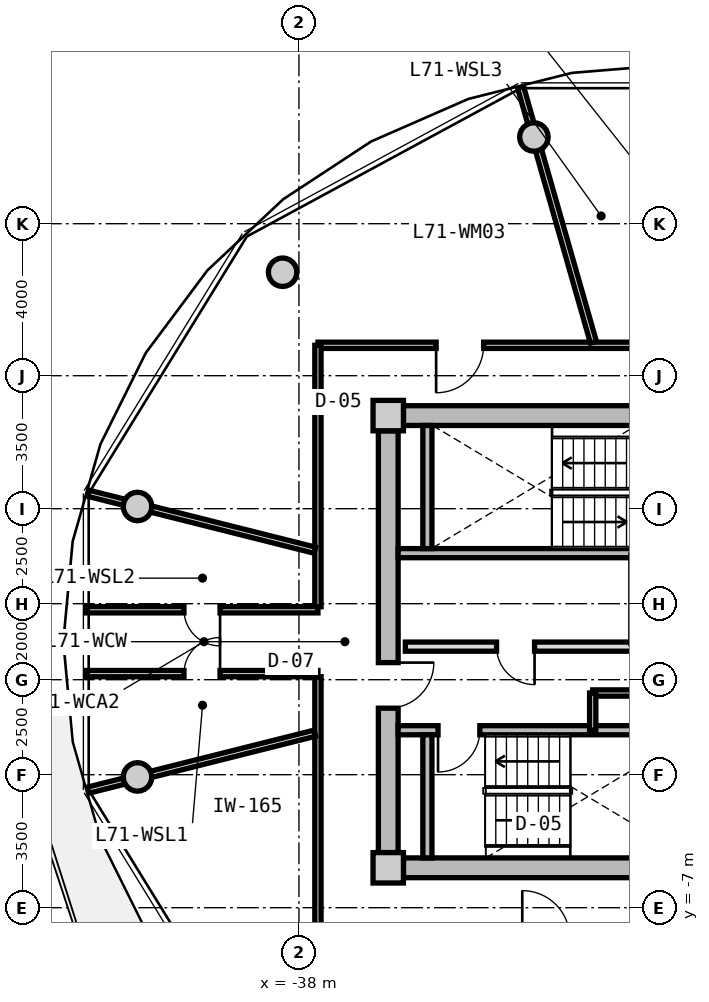
"""IFC4 building model, lengths in metres.
Left out: names, types, materials, properties, quantities, classifications, styles, units other than length and angle.
Written with IfcOpenShell. Run it as: python <this file> out.ifc"""

import sys

from ifc_helpers import new_model, si_unit, direction, frame, frame_2d, origin, origin_2d, place, context, subcontext, project, spatial, rectangle, circle, extrude, source, transform, mapped, element, fill, save


model = new_model("IFC4")
c1 = context("Model", 3, precision=1e-05, world=origin(), true_north=direction((0.0, 1.0)))
c2 = subcontext(c1, "Body", "Model", "MODEL_VIEW")
j1 = project(units=[si_unit("LENGTHUNIT", "METRE"), si_unit("PLANEANGLEUNIT", "RADIAN")], contexts=[c1])
p1 = place(None, origin())
s1 = spatial("IfcSite", under=j1, at=p1, CompositionType="ELEMENT")
p2 = place(p1, origin())
s2 = spatial("IfcBuilding", under=s1, at=p2, CompositionType="ELEMENT")
p3 = place(p2, frame((0.0, 0.0, 229.15)))
s3 = spatial("IfcBuildingStorey", under=s2, at=p3, CompositionType="ELEMENT", Elevation=229.15)
m1 = source(origin(), c2, "Body", "SweptSolid", [
    extrude(rectangle(XDim=0.8, YDim=0.8, at=origin_2d()), origin(), (0.0, 0.0, 1.0), 3.05),
])
for number, where, z_axis, x_axis in (
    (1, (-35.65, -5.95, 0.0), (0.0, 0.0, 1.0), (1.0, 0.0, 0.0)),
    (2, (-35.65, 5.95, 0.0), (0.0, 0.0, 1.0), (1.0, 0.0, 0.0)),
):
    element("IfcColumn", number, at=place(p3, frame(where, z_axis=z_axis, x_axis=x_axis)), inside=s3, PredefinedType="COLUMN", context=c2, shape_type="MappedRepresentation", body=[
        mapped(m1, transform((0.0, 0.0, 0.0), x_axis=(1.0, 0.0, 0.0), y_axis=(0.0, 1.0, 0.0), z_axis=(0.0, 0.0, 1.0), scale=1.0)),
    ])
m2 = source(origin(), c2, "Body", "SweptSolid", [
    extrude(rectangle(XDim=14.5, YDim=0.52, at=frame_2d((7.25, 0.0))), origin(), (0.0, 0.0, 1.0), 2.81),
])
for number, where, z_axis, x_axis in (
    (3, (-35.25, 5.95, 0.0), (0.0, 0.0, 1.0), (1.0, 0.0, 0.0)),
    (4, (-20.75, -5.95, 0.0), (0.0, 0.0, 1.0), (-1.0, 0.0, 0.0)),
):
    element("IfcWall", number, at=place(p3, frame(where, z_axis=z_axis, x_axis=x_axis)), inside=s3, PredefinedType="SHEAR", context=c2, shape_type="MappedRepresentation", body=[
        mapped(m2, transform((0.0, 0.0, 0.0), x_axis=(1.0, 0.0, 0.0), y_axis=(0.0, 1.0, 0.0), z_axis=(0.0, 0.0, 1.0), scale=1.0)),
    ])
m3 = source(origin(), c2, "Body", "SweptSolid", [
    extrude(rectangle(XDim=11.1, YDim=0.52, at=frame_2d((5.55, 0.0))), origin(), (0.0, 0.0, 1.0), 2.81),
])
p4 = place(p3, frame((-35.65, -5.55, 0.0), z_axis=(0.0, 0.0, 1.0), x_axis=(0.0, 1.0, 0.0)))
e5 = element("IfcWall", 5, at=p4, inside=s3, PredefinedType="SHEAR", context=c2, shape_type="MappedRepresentation", body=[
    mapped(m3, transform((0.0, 0.0, 0.0), x_axis=(1.0, 0.0, 0.0), y_axis=(0.0, 1.0, 0.0), z_axis=(0.0, 0.0, 1.0), scale=1.0)),
])
p5 = place(p4, frame((3.8, 0.0, 0.0)))
e6 = element("IfcOpeningElement", 6, at=p5, cuts=e5, PredefinedType="OPENING", context=c2, shape_type="SweptSolid", body=[
    extrude(rectangle(XDim=1.2, YDim=2.15, at=frame_2d((0.6, 1.075))), frame((0.0, 0.27, 0.0), z_axis=(0.0, -1.0, 0.0), x_axis=(1.0, 0.0, 0.0)), (0.0, 0.0, 1.0), 0.54),
])
m4 = source(origin(), c2, "Body", "SweptSolid", [
    extrude(circle(Radius=0.375, at=origin_2d()), origin(), (0.0, 0.0, 1.0), 3.05),
])
for number, where, z_axis, x_axis in (
    (7, (-31.818, 13.281, 0.0), (0.0, 0.0, 1.0), (1.0, 0.0, 0.0)),
    (8, (-38.43, 9.723, 0.0), (0.0, 0.0, 1.0), (1.0, 0.0, 0.0)),
    (9, (-42.247, 3.559, 0.0), (0.0, 0.0, 1.0), (1.0, 0.0, 0.0)),
    (10, (-42.247, -3.559, 0.0), (0.0, 0.0, 1.0), (1.0, 0.0, 0.0)),
):
    element("IfcColumn", number, at=place(p3, frame(where, z_axis=z_axis, x_axis=x_axis)), inside=s3, PredefinedType="COLUMN", context=c2, shape_type="MappedRepresentation", body=[
        mapped(m4, transform((0.0, 0.0, 0.0), x_axis=(1.0, 0.0, 0.0), y_axis=(0.0, 1.0, 0.0), z_axis=(0.0, 0.0, 1.0), scale=1.0)),
    ])
m5 = source(origin(), c2, "Body", "SweptSolid", [
    extrude(rectangle(XDim=7.93, YDim=0.24, at=frame_2d((3.965, 0.0))), origin(), (0.0, 0.0, 1.0), 2.81),
])
p6 = place(p3, frame((-35.39, 2.33, 0.0), z_axis=(0.0, 0.0, 1.0), x_axis=(1.0, 0.0, 0.0)))
e11 = element("IfcWall", 11, at=p6, inside=s3, PredefinedType="PARTITIONING", context=c2, shape_type="MappedRepresentation", body=[
    mapped(m5, transform((0.0, 0.0, 0.0), x_axis=(1.0, 0.0, 0.0), y_axis=(0.0, 1.0, 0.0), z_axis=(0.0, 0.0, 1.0), scale=1.0)),
])
m6 = source(origin(), c2, "Body", "SweptSolid", [
    extrude(rectangle(XDim=3.24, YDim=0.24, at=frame_2d((1.62, 0.0))), origin(), (0.0, 0.0, 1.0), 2.81),
])
p7 = place(p3, frame((-34.62, 2.45, 0.0), z_axis=(0.0, 0.0, 1.0), x_axis=(0.0, 1.0, 0.0)))
e12 = element("IfcWall", 12, at=p7, inside=s3, PredefinedType="PARTITIONING", context=c2, shape_type="MappedRepresentation", body=[
    mapped(m6, transform((0.0, 0.0, 0.0), x_axis=(1.0, 0.0, 0.0), y_axis=(0.0, 1.0, 0.0), z_axis=(0.0, 0.0, 1.0), scale=1.0)),
])
p8 = place(p3, frame((-35.39, -2.33, 0.0), z_axis=(0.0, 0.0, 1.0), x_axis=(1.0, 0.0, 0.0)))
e13 = element("IfcWall", 13, at=p8, inside=s3, PredefinedType="PARTITIONING", context=c2, shape_type="MappedRepresentation", body=[
    mapped(m5, transform((0.0, 0.0, 0.0), x_axis=(1.0, 0.0, 0.0), y_axis=(0.0, 1.0, 0.0), z_axis=(0.0, 0.0, 1.0), scale=1.0)),
])
p9 = place(p8, frame((1.05, 0.0, 0.0)))
e14 = element("IfcOpeningElement", 14, at=p9, cuts=e13, PredefinedType="OPENING", context=c2, shape_type="SweptSolid", body=[
    extrude(rectangle(XDim=1.1, YDim=2.15, at=frame_2d((0.55, 1.075))), frame((0.0, 0.13, 0.0), z_axis=(0.0, -1.0, 0.0), x_axis=(1.0, 0.0, 0.0)), (0.0, 0.0, 1.0), 0.26),
])
p10 = place(p3, frame((-34.62, -5.69, 0.0), z_axis=(0.0, 0.0, 1.0), x_axis=(0.0, 1.0, 0.0)))
e15 = element("IfcWall", 15, at=p10, inside=s3, PredefinedType="PARTITIONING", context=c2, shape_type="MappedRepresentation", body=[
    mapped(m6, transform((0.0, 0.0, 0.0), x_axis=(1.0, 0.0, 0.0), y_axis=(0.0, 1.0, 0.0), z_axis=(0.0, 0.0, 1.0), scale=1.0)),
])
m7 = source(origin(), c2, "Body", "SweptSolid", [
    extrude(rectangle(XDim=7.62, YDim=0.24, at=frame_2d((3.81, 0.0))), origin(), (0.0, 0.0, 1.0), 2.795),
])
p11 = place(p3, frame((-35.2, -0.13, 0.0), z_axis=(0.0, 0.0, 1.0), x_axis=(1.0, 0.0, 0.0)))
e16 = element("IfcWall", 16, at=p11, inside=s3, PredefinedType="PARTITIONING", context=c2, shape_type="MappedRepresentation", body=[
    mapped(m7, transform((0.0, 0.0, 0.0), x_axis=(1.0, 0.0, 0.0), y_axis=(0.0, 1.0, 0.0), z_axis=(0.0, 0.0, 1.0), scale=1.0)),
])
p12 = place(p11, frame((6.22, 0.0, 0.0)))
e17 = element("IfcOpeningElement", 17, at=p12, cuts=e16, PredefinedType="OPENING", context=c2, shape_type="SweptSolid", body=[
    extrude(rectangle(XDim=1.0, YDim=2.1, at=frame_2d((0.5, 1.05))), frame((0.0, 0.13, 0.0), z_axis=(0.0, -1.0, 0.0), x_axis=(1.0, 0.0, 0.0)), (0.0, 0.0, 1.0), 0.26),
])
p13 = place(p11, frame((2.4, 0.0, 0.0)))
e18 = element("IfcOpeningElement", 18, at=p13, cuts=e16, PredefinedType="OPENING", context=c2, shape_type="SweptSolid", body=[
    extrude(rectangle(XDim=1.0, YDim=2.1, at=frame_2d((0.5, 1.05))), frame((0.0, 0.13, 0.0), z_axis=(0.0, -1.0, 0.0), x_axis=(1.0, 0.0, 0.0)), (0.0, 0.0, 1.0), 0.26),
])
m8 = source(origin(), c2, "Body", "SweptSolid", [
    extrude(rectangle(XDim=4.77, YDim=0.165, at=frame_2d((2.385, 0.0))), origin(), (0.0, 0.0, 1.0), 2.795),
])
p14 = place(p3, frame((-30.27, -1.35, 0.0), z_axis=(0.0, 0.0, 1.0), x_axis=(1.0, 0.0, 0.0)))
e19 = element("IfcWall", 19, at=p14, inside=s3, PredefinedType="PARTITIONING", context=c2, shape_type="MappedRepresentation", body=[
    mapped(m8, transform((0.0, 0.0, 0.0), x_axis=(1.0, 0.0, 0.0), y_axis=(0.0, 1.0, 0.0), z_axis=(0.0, 0.0, 1.0), scale=1.0)),
])
p15 = place(p14, frame((1.85, 0.0, 0.0)))
e20 = element("IfcOpeningElement", 20, at=p15, cuts=e19, PredefinedType="OPENING", context=c2, shape_type="SweptSolid", body=[
    extrude(rectangle(XDim=1.0, YDim=2.1, at=frame_2d((0.5, 1.05))), frame((0.0, 0.093, 0.0), z_axis=(0.0, -1.0, 0.0), x_axis=(1.0, 0.0, 0.0)), (0.0, 0.0, 1.0), 0.185),
])
m9 = source(origin(), c2, "Body", "SweptSolid", [
    extrude(rectangle(XDim=0.98, YDim=0.165, at=frame_2d((0.49, 0.0))), origin(), (0.0, 0.0, 1.0), 2.795),
])
p16 = place(p3, frame((-30.27, -2.33, 0.0), z_axis=(0.0, 0.0, 1.0), x_axis=(0.0, 1.0, 0.0)))
e21 = element("IfcWall", 21, at=p16, inside=s3, PredefinedType="PARTITIONING", context=c2, shape_type="MappedRepresentation", body=[
    mapped(m9, transform((0.0, 0.0, 0.0), x_axis=(1.0, 0.0, 0.0), y_axis=(0.0, 1.0, 0.0), z_axis=(0.0, 0.0, 1.0), scale=1.0)),
])
m10 = source(origin(), c2, "Body", "SweptSolid", [
    extrude(rectangle(XDim=8.58, YDim=0.165, at=frame_2d((4.29, 0.0))), origin(), (0.0, 0.0, 1.0), 2.795),
])
p17 = place(p3, frame((-37.5, 7.8, 0.0), z_axis=(0.0, 0.0, 1.0), x_axis=(1.0, 0.0, 0.0)))
e22 = element("IfcWall", 22, at=p17, inside=s3, PredefinedType="PARTITIONING", context=c2, shape_type="MappedRepresentation", body=[
    mapped(m10, transform((0.0, 0.0, 0.0), x_axis=(1.0, 0.0, 0.0), y_axis=(0.0, 1.0, 0.0), z_axis=(0.0, 0.0, 1.0), scale=1.0)),
])
p18 = place(p17, frame((3.11, 0.0, 0.0)))
e23 = element("IfcOpeningElement", 23, at=p18, cuts=e22, PredefinedType="OPENING", context=c2, shape_type="SweptSolid", body=[
    extrude(rectangle(XDim=1.25, YDim=2.2, at=frame_2d((0.625, 1.1))), frame((0.0, 0.093, 0.0), z_axis=(0.0, -1.0, 0.0), x_axis=(1.0, 0.0, 0.0)), (0.0, 0.0, 1.0), 0.185),
])
m11 = source(origin(), c2, "Body", "SweptSolid", [
    extrude(rectangle(XDim=6.88, YDim=0.165, at=frame_2d((3.44, 0.0))), origin(), (0.0, 0.0, 1.0), 2.795),
])
for number, where, z_axis, x_axis in (
    (24, (-37.5, -7.8, 0.0), (0.0, 0.0, 1.0), (0.0, 1.0, 0.0)),
    (25, (-37.5, 0.92, 0.0), (0.0, 0.0, 1.0), (0.0, 1.0, 0.0)),
):
    element("IfcWall", number, at=place(p3, frame(where, z_axis=z_axis, x_axis=x_axis)), inside=s3, PredefinedType="PARTITIONING", context=c2, shape_type="MappedRepresentation", body=[
        mapped(m11, transform((0.0, 0.0, 0.0), x_axis=(1.0, 0.0, 0.0), y_axis=(0.0, 1.0, 0.0), z_axis=(0.0, 0.0, 1.0), scale=1.0)),
    ])
m12 = source(origin(), c2, "Body", "SweptSolid", [
    extrude(rectangle(XDim=6.974, YDim=0.165, at=frame_2d((3.487, 0.0))), origin(), (0.0, 0.0, 1.0), 2.395),
])
p19 = place(p3, frame((-30.251, 7.88, 0.0), z_axis=(0.0, 0.0, 1.0), x_axis=(-0.274707256801, 0.961527910703, 0.0)))
e26 = element("IfcWall", 26, at=p19, inside=s3, PredefinedType="PARTITIONING", context=c2, shape_type="MappedRepresentation", body=[
    mapped(m12, transform((0.0, 0.0, 0.0), x_axis=(1.0, 0.0, 0.0), y_axis=(0.0, 1.0, 0.0), z_axis=(0.0, 0.0, 1.0), scale=1.0)),
])
m13 = source(origin(), c2, "Body", "SweptSolid", [
    extrude(rectangle(XDim=6.157, YDim=0.165, at=frame_2d((3.079, 0.0))), origin(), (0.0, 0.0, 1.0), 2.395),
])
for number, where, z_axis, x_axis in (
    (27, (-37.58, 2.407, 0.0), (0.0, 0.0, 1.0), (-0.97, 0.244, 0.0)),
    (28, (-37.58, -2.407, 0.0), (0.0, 0.0, 1.0), (-0.97, -0.244, 0.0)),
):
    element("IfcWall", number, at=place(p3, frame(where, z_axis=z_axis, x_axis=x_axis)), inside=s3, PredefinedType="PARTITIONING", context=c2, shape_type="MappedRepresentation", body=[
        mapped(m13, transform((0.0, 0.0, 0.0), x_axis=(1.0, 0.0, 0.0), y_axis=(0.0, 1.0, 0.0), z_axis=(0.0, 0.0, 1.0), scale=1.0)),
    ])
m14 = source(origin(), c2, "Body", "SweptSolid", [
    extrude(rectangle(XDim=6.101, YDim=0.165, at=frame_2d((3.051, 0.0))), origin(), (0.0, 0.0, 1.0), 2.795),
])
p20 = place(p3, frame((-43.601, 0.84, 0.0), z_axis=(0.0, 0.0, 1.0), x_axis=(1.0, 0.0, 0.0)))
e29 = element("IfcWall", 29, at=p20, inside=s3, PredefinedType="PARTITIONING", context=c2, shape_type="MappedRepresentation", body=[
    mapped(m14, transform((0.0, 0.0, 0.0), x_axis=(1.0, 0.0, 0.0), y_axis=(0.0, 1.0, 0.0), z_axis=(0.0, 0.0, 1.0), scale=1.0)),
])
p21 = place(p20, frame((2.576, 0.0, 0.0)))
e30 = element("IfcOpeningElement", 30, at=p21, cuts=e29, PredefinedType="OPENING", context=c2, shape_type="SweptSolid", body=[
    extrude(rectangle(XDim=0.95, YDim=2.1, at=frame_2d((0.475, 1.05))), frame((0.0, 0.093, 0.0), z_axis=(0.0, -1.0, 0.0), x_axis=(1.0, 0.0, 0.0)), (0.0, 0.0, 1.0), 0.185),
])
p22 = place(p3, frame((-37.5, -0.84, 0.0), z_axis=(0.0, 0.0, 1.0), x_axis=(-1.0, 0.0, 0.0)))
e31 = element("IfcWall", 31, at=p22, inside=s3, PredefinedType="PARTITIONING", context=c2, shape_type="MappedRepresentation", body=[
    mapped(m14, transform((0.0, 0.0, 0.0), x_axis=(1.0, 0.0, 0.0), y_axis=(0.0, 1.0, 0.0), z_axis=(0.0, 0.0, 1.0), scale=1.0)),
])
p23 = place(p22, frame((2.576, 0.0, 0.0)))
e32 = element("IfcOpeningElement", 32, at=p23, cuts=e31, PredefinedType="OPENING", context=c2, shape_type="SweptSolid", body=[
    extrude(rectangle(XDim=0.95, YDim=2.1, at=frame_2d((0.475, 1.05))), frame((0.0, 0.093, 0.0), z_axis=(0.0, -1.0, 0.0), x_axis=(1.0, 0.0, 0.0)), (0.0, 0.0, 1.0), 0.185),
])
m15 = source(origin(), c2, "Body", "SweptSolid", [
    extrude(rectangle(XDim=1.1, YDim=2.15, at=frame_2d((0.55, 1.075))), frame((0.0, 0.025, 0.0), z_axis=(0.0, -1.0, 0.0), x_axis=(1.0, 0.0, 0.0)), (0.0, 0.0, 1.0), 0.05),
])
p24 = place(p9, frame((1.1, 0.0, 0.0), z_axis=(0.0, 0.0, 1.0), x_axis=(-1.0, 0.0, 0.0)))
e33 = element("IfcDoor", 33, at=p24, inside=s3, OperationType="SINGLE_SWING_RIGHT", PredefinedType="DOOR", context=c2, shape_type="MappedRepresentation", body=[
    mapped(m15, transform((0.0, 0.0, 0.0), x_axis=(1.0, 0.0, 0.0), y_axis=(0.0, 1.0, 0.0), z_axis=(0.0, 0.0, 1.0), scale=1.0)),
])
fill(e14, e33)
m16 = source(origin(), c2, "Body", "SweptSolid", [
    extrude(rectangle(XDim=1.2, YDim=2.15, at=frame_2d((0.6, 1.075))), frame((0.0, 0.025, 0.0), z_axis=(0.0, -1.0, 0.0), x_axis=(1.0, 0.0, 0.0)), (0.0, 0.0, 1.0), 0.05),
])
p25 = place(p5, frame((1.2, 0.0, 0.0), z_axis=(0.0, 0.0, 1.0), x_axis=(-1.0, 0.0, 0.0)))
e34 = element("IfcDoor", 34, at=p25, inside=s3, OperationType="SINGLE_SWING_LEFT", PredefinedType="DOOR", context=c2, shape_type="MappedRepresentation", body=[
    mapped(m16, transform((0.0, 0.0, 0.0), x_axis=(1.0, 0.0, 0.0), y_axis=(0.0, 1.0, 0.0), z_axis=(0.0, 0.0, 1.0), scale=1.0)),
])
fill(e6, e34)
m17 = source(origin(), c2, "Body", "SweptSolid", [
    extrude(rectangle(XDim=1.0, YDim=2.1, at=frame_2d((0.5, 1.05))), frame((0.0, 0.025, 0.0), z_axis=(0.0, -1.0, 0.0), x_axis=(1.0, 0.0, 0.0)), (0.0, 0.0, 1.0), 0.05),
])
p26 = place(p13, frame((1.0, 0.0, 0.0), z_axis=(0.0, 0.0, 1.0), x_axis=(-1.0, 0.0, 0.0)))
e35 = element("IfcDoor", 35, at=p26, inside=s3, OperationType="SINGLE_SWING_LEFT", PredefinedType="DOOR", context=c2, shape_type="MappedRepresentation", body=[
    mapped(m17, transform((0.0, 0.0, 0.0), x_axis=(1.0, 0.0, 0.0), y_axis=(0.0, 1.0, 0.0), z_axis=(0.0, 0.0, 1.0), scale=1.0)),
])
fill(e18, e35)
m18 = source(origin(), c2, "Body", "SweptSolid", [
    extrude(rectangle(XDim=0.95, YDim=2.1, at=frame_2d((0.475, 1.05))), frame((0.0, 0.025, 0.0), z_axis=(0.0, -1.0, 0.0), x_axis=(1.0, 0.0, 0.0)), (0.0, 0.0, 1.0), 0.05),
])
p27 = place(p23, frame((0.95, 0.0, 0.0), z_axis=(0.0, 0.0, 1.0), x_axis=(-1.0, 0.0, 0.0)))
e36 = element("IfcDoor", 36, at=p27, inside=s3, OperationType="SINGLE_SWING_RIGHT", PredefinedType="DOOR", context=c2, shape_type="MappedRepresentation", body=[
    mapped(m18, transform((0.0, 0.0, 0.0), x_axis=(1.0, 0.0, 0.0), y_axis=(0.0, 1.0, 0.0), z_axis=(0.0, 0.0, 1.0), scale=1.0)),
])
fill(e32, e36)
p28 = place(p21, frame((0.95, 0.0, 0.0), z_axis=(0.0, 0.0, 1.0), x_axis=(-1.0, 0.0, 0.0)))
e37 = element("IfcDoor", 37, at=p28, inside=s3, OperationType="SINGLE_SWING_LEFT", PredefinedType="DOOR", context=c2, shape_type="MappedRepresentation", body=[
    mapped(m18, transform((0.0, 0.0, 0.0), x_axis=(1.0, 0.0, 0.0), y_axis=(0.0, 1.0, 0.0), z_axis=(0.0, 0.0, 1.0), scale=1.0)),
])
fill(e30, e37)
m19 = source(origin(), c2, "Body", "SweptSolid", [
    extrude(rectangle(XDim=1.25, YDim=2.2, at=frame_2d((0.625, 1.1))), frame((0.0, 0.025, 0.0), z_axis=(0.0, -1.0, 0.0), x_axis=(1.0, 0.0, 0.0)), (0.0, 0.0, 1.0), 0.05),
])
p29 = place(p18, frame((1.25, 0.0, 0.0), z_axis=(0.0, 0.0, 1.0), x_axis=(-1.0, 0.0, 0.0)))
e38 = element("IfcDoor", 38, at=p29, inside=s3, OperationType="SINGLE_SWING_RIGHT", PredefinedType="DOOR", context=c2, shape_type="MappedRepresentation", body=[
    mapped(m19, transform((0.0, 0.0, 0.0), x_axis=(1.0, 0.0, 0.0), y_axis=(0.0, 1.0, 0.0), z_axis=(0.0, 0.0, 1.0), scale=1.0)),
])
fill(e23, e38)
save(model, sys.argv[1])
